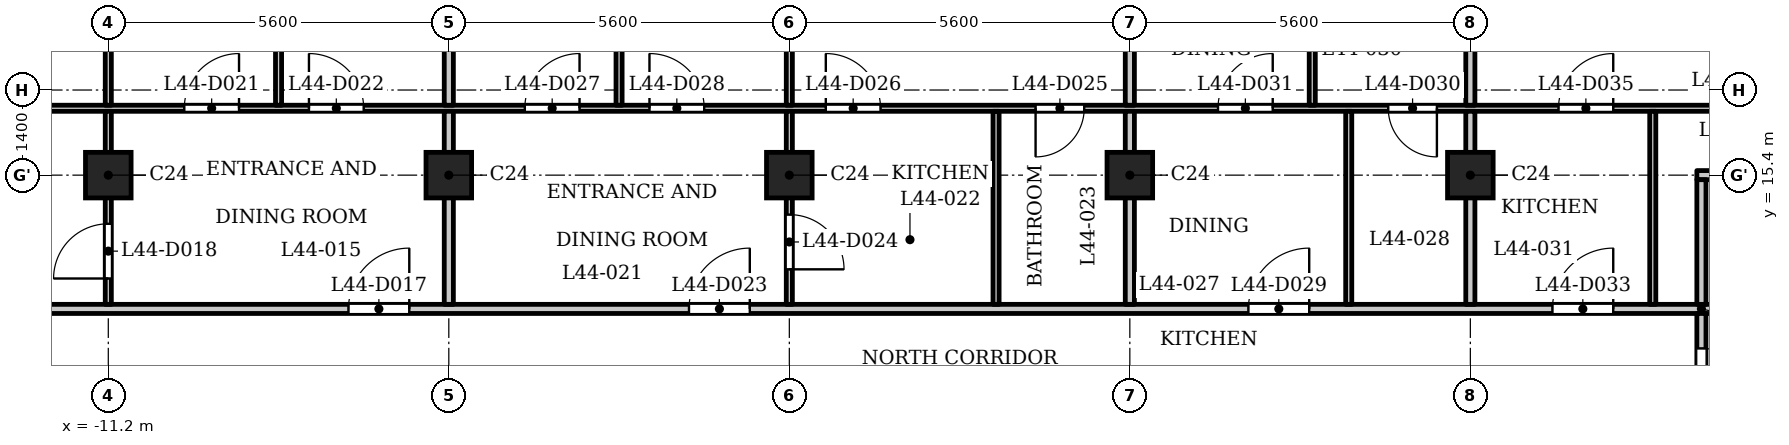
"""IFC4 building model, lengths in metres.
Left out: names, types, materials, properties, quantities, classifications, styles, units other than length and angle.
Written with IfcOpenShell. Run it as: python <this file> out.ifc"""

import sys

from ifc_helpers import new_model, si_unit, direction, frame, frame_2d, origin, origin_2d, place, context, subcontext, project, spatial, rectangle, extrude, element, fill, save


model = new_model("IFC4")
c1 = context("Model", 3, precision=1e-05, world=origin(), true_north=direction((0.0, 1.0)))
c2 = subcontext(c1, "Body", "Model", "MODEL_VIEW")
j1 = project(units=[si_unit("LENGTHUNIT", "METRE"), si_unit("PLANEANGLEUNIT", "RADIAN")], contexts=[c1])
p1 = place(None, origin())
s1 = spatial("IfcSite", under=j1, at=p1, CompositionType="ELEMENT")
p2 = place(p1, origin())
s2 = spatial("IfcBuilding", under=s1, at=p2, CompositionType="ELEMENT")
p3 = place(p2, frame((0.0, 0.0, 171.1)))
s3 = spatial("IfcBuildingStorey", under=s2, at=p3, CompositionType="ELEMENT", Elevation=171.1)
for number, where, z_axis, x_axis in (
    (1, (-11.2, 15.4, 0.0), (0.0, 0.0, 1.0), (1.0, 0.0, 0.0)),
    (2, (-5.6, 15.4, 0.0), (0.0, 0.0, 1.0), (1.0, 0.0, 0.0)),
    (3, (0.0, 15.4, 0.0), (0.0, 0.0, 1.0), (1.0, 0.0, 0.0)),
    (4, (5.6, 15.4, 0.0), (0.0, 0.0, 1.0), (1.0, 0.0, 0.0)),
    (5, (11.2, 15.4, 0.0), (0.0, 0.0, 1.0), (1.0, 0.0, 0.0)),
):
    element("IfcColumn", number, at=place(p3, frame(where, z_axis=z_axis, x_axis=x_axis)), inside=s3, PredefinedType="COLUMN", context=c2, shape_type="SweptSolid", body=[
        extrude(rectangle(XDim=0.75, YDim=0.75, at=origin_2d()), origin(), (0.0, 0.0, 1.0), 3.5),
    ])
p4 = place(p3, frame((-17.4, 13.2, 0.0), z_axis=(0.0, 0.0, 1.0), x_axis=(1.0, 0.0, 0.0)))
e6 = element("IfcWall", 6, at=p4, inside=s3, PredefinedType="PARTITIONING", context=c2, shape_type="SweptSolid", body=[
    extrude(rectangle(XDim=34.8, YDim=0.15, at=frame_2d((17.4, 0.0))), origin(), (0.0, 0.0, 1.0), 3.2),
])
p5 = place(p4, frame((0.25, 0.0, 0.0)))
e7 = element("IfcOpeningElement", 7, at=p5, cuts=e6, PredefinedType="OPENING", context=c2, shape_type="SweptSolid", body=[
    extrude(rectangle(XDim=1.0, YDim=2.1, at=frame_2d((0.5, 1.05))), frame((0.0, 0.085, 0.0), z_axis=(0.0, -1.0, 0.0), x_axis=(1.0, 0.0, 0.0)), (0.0, 0.0, 1.0), 0.17),
])
p6 = place(p4, frame((33.65, 0.0, 0.0)))
e8 = element("IfcOpeningElement", 8, at=p6, cuts=e6, PredefinedType="OPENING", context=c2, shape_type="SweptSolid", body=[
    extrude(rectangle(XDim=1.0, YDim=2.1, at=frame_2d((0.5, 1.05))), frame((0.0, 0.085, 0.0), z_axis=(0.0, -1.0, 0.0), x_axis=(1.0, 0.0, 0.0)), (0.0, 0.0, 1.0), 0.17),
])
p7 = place(p4, frame((10.15, 0.0, 0.0)))
e9 = element("IfcOpeningElement", 9, at=p7, cuts=e6, PredefinedType="OPENING", context=c2, shape_type="SweptSolid", body=[
    extrude(rectangle(XDim=1.0, YDim=2.1, at=frame_2d((0.5, 1.05))), frame((0.0, 0.085, 0.0), z_axis=(0.0, -1.0, 0.0), x_axis=(1.0, 0.0, 0.0)), (0.0, 0.0, 1.0), 0.17),
])
p8 = place(p4, frame((15.75, 0.0, 0.0)))
e10 = element("IfcOpeningElement", 10, at=p8, cuts=e6, PredefinedType="OPENING", context=c2, shape_type="SweptSolid", body=[
    extrude(rectangle(XDim=1.0, YDim=2.1, at=frame_2d((0.5, 1.05))), frame((0.0, 0.085, 0.0), z_axis=(0.0, -1.0, 0.0), x_axis=(1.0, 0.0, 0.0)), (0.0, 0.0, 1.0), 0.17),
])
p9 = place(p4, frame((24.95, 0.0, 0.0)))
e11 = element("IfcOpeningElement", 11, at=p9, cuts=e6, PredefinedType="OPENING", context=c2, shape_type="SweptSolid", body=[
    extrude(rectangle(XDim=1.0, YDim=2.1, at=frame_2d((0.5, 1.05))), frame((0.0, 0.085, 0.0), z_axis=(0.0, -1.0, 0.0), x_axis=(1.0, 0.0, 0.0)), (0.0, 0.0, 1.0), 0.17),
])
p10 = place(p4, frame((29.95, 0.0, 0.0)))
e12 = element("IfcOpeningElement", 12, at=p10, cuts=e6, PredefinedType="OPENING", context=c2, shape_type="SweptSolid", body=[
    extrude(rectangle(XDim=1.0, YDim=2.1, at=frame_2d((0.5, 1.05))), frame((0.0, 0.085, 0.0), z_axis=(0.0, -1.0, 0.0), x_axis=(1.0, 0.0, 0.0)), (0.0, 0.0, 1.0), 0.17),
])
p11 = place(p3, frame((14.925, 15.4, 0.0), z_axis=(0.0, 0.0, 1.0), x_axis=(1.0, 0.0, 0.0)))
e13 = element("IfcWall", 13, at=p11, inside=s3, PredefinedType="PARTITIONING", context=c2, shape_type="SweptSolid", body=[
    extrude(rectangle(XDim=12.559, YDim=0.15, at=frame_2d((6.279, 0.0))), origin(), (0.0, 0.0, 1.0), 3.2),
])
p12 = place(p11, frame((2.575, 0.0, 0.0)))
e14 = element("IfcOpeningElement", 14, at=p12, cuts=e13, PredefinedType="OPENING", context=c2, shape_type="SweptSolid", body=[
    extrude(rectangle(XDim=1.0, YDim=2.1, at=frame_2d((0.5, 1.05))), frame((0.0, 0.085, 0.0), z_axis=(0.0, -1.0, 0.0), x_axis=(1.0, 0.0, 0.0)), (0.0, 0.0, 1.0), 0.17),
])
p13 = place(p3, frame((-16.725, 16.5, 0.0), z_axis=(0.0, 0.0, 1.0), x_axis=(1.0, 0.0, 0.0)))
e15 = element("IfcWall", 15, at=p13, inside=s3, PredefinedType="PARTITIONING", context=c2, shape_type="SweptSolid", body=[
    extrude(rectangle(XDim=33.45, YDim=0.1, at=frame_2d((16.725, 0.0))), origin(), (0.0, 0.0, 1.0), 3.2),
])
p14 = place(p13, frame((0.575, 0.0, 0.0)))
e16 = element("IfcOpeningElement", 16, at=p14, cuts=e15, PredefinedType="OPENING", context=c2, shape_type="SweptSolid", body=[
    extrude(rectangle(XDim=0.8, YDim=2.1, at=frame_2d((0.4, 1.05))), frame((0.0, 0.06, 0.0), z_axis=(0.0, -1.0, 0.0), x_axis=(1.0, 0.0, 0.0)), (0.0, 0.0, 1.0), 0.12),
])
p15 = place(p13, frame((3.225, 0.0, 0.0)))
e17 = element("IfcOpeningElement", 17, at=p15, cuts=e15, PredefinedType="OPENING", context=c2, shape_type="SweptSolid", body=[
    extrude(rectangle(XDim=0.9, YDim=2.1, at=frame_2d((0.45, 1.05))), frame((0.0, 0.06, 0.0), z_axis=(0.0, -1.0, 0.0), x_axis=(1.0, 0.0, 0.0)), (0.0, 0.0, 1.0), 0.12),
])
p16 = place(p13, frame((6.775, 0.0, 0.0)))
e18 = element("IfcOpeningElement", 18, at=p16, cuts=e15, PredefinedType="OPENING", context=c2, shape_type="SweptSolid", body=[
    extrude(rectangle(XDim=0.9, YDim=2.1, at=frame_2d((0.45, 1.05))), frame((0.0, 0.06, 0.0), z_axis=(0.0, -1.0, 0.0), x_axis=(1.0, 0.0, 0.0)), (0.0, 0.0, 1.0), 0.12),
])
p17 = place(p13, frame((8.825, 0.0, 0.0)))
e19 = element("IfcOpeningElement", 19, at=p17, cuts=e15, PredefinedType="OPENING", context=c2, shape_type="SweptSolid", body=[
    extrude(rectangle(XDim=0.9, YDim=2.1, at=frame_2d((0.45, 1.05))), frame((0.0, 0.06, 0.0), z_axis=(0.0, -1.0, 0.0), x_axis=(1.0, 0.0, 0.0)), (0.0, 0.0, 1.0), 0.12),
])
p18 = place(p13, frame((20.775, 0.0, 0.0)))
e20 = element("IfcOpeningElement", 20, at=p18, cuts=e15, PredefinedType="OPENING", context=c2, shape_type="SweptSolid", body=[
    extrude(rectangle(XDim=0.8, YDim=2.1, at=frame_2d((0.4, 1.05))), frame((0.0, 0.06, 0.0), z_axis=(0.0, -1.0, 0.0), x_axis=(1.0, 0.0, 0.0)), (0.0, 0.0, 1.0), 0.12),
])
p19 = place(p13, frame((17.325, 0.0, 0.0)))
e21 = element("IfcOpeningElement", 21, at=p19, cuts=e15, PredefinedType="OPENING", context=c2, shape_type="SweptSolid", body=[
    extrude(rectangle(XDim=0.9, YDim=2.1, at=frame_2d((0.45, 1.05))), frame((0.0, 0.06, 0.0), z_axis=(0.0, -1.0, 0.0), x_axis=(1.0, 0.0, 0.0)), (0.0, 0.0, 1.0), 0.12),
])
p20 = place(p13, frame((12.375, 0.0, 0.0)))
e22 = element("IfcOpeningElement", 22, at=p20, cuts=e15, PredefinedType="OPENING", context=c2, shape_type="SweptSolid", body=[
    extrude(rectangle(XDim=0.9, YDim=2.1, at=frame_2d((0.45, 1.05))), frame((0.0, 0.06, 0.0), z_axis=(0.0, -1.0, 0.0), x_axis=(1.0, 0.0, 0.0)), (0.0, 0.0, 1.0), 0.12),
])
p21 = place(p13, frame((14.425, 0.0, 0.0)))
e23 = element("IfcOpeningElement", 23, at=p21, cuts=e15, PredefinedType="OPENING", context=c2, shape_type="SweptSolid", body=[
    extrude(rectangle(XDim=0.9, YDim=2.1, at=frame_2d((0.45, 1.05))), frame((0.0, 0.06, 0.0), z_axis=(0.0, -1.0, 0.0), x_axis=(1.0, 0.0, 0.0)), (0.0, 0.0, 1.0), 0.12),
])
p22 = place(p13, frame((26.575, 0.0, 0.0)))
e24 = element("IfcOpeningElement", 24, at=p22, cuts=e15, PredefinedType="OPENING", context=c2, shape_type="SweptSolid", body=[
    extrude(rectangle(XDim=0.8, YDim=2.1, at=frame_2d((0.4, 1.05))), frame((0.0, 0.06, 0.0), z_axis=(0.0, -1.0, 0.0), x_axis=(1.0, 0.0, 0.0)), (0.0, 0.0, 1.0), 0.12),
])
p23 = place(p13, frame((23.775, 0.0, 0.0)))
e25 = element("IfcOpeningElement", 25, at=p23, cuts=e15, PredefinedType="OPENING", context=c2, shape_type="SweptSolid", body=[
    extrude(rectangle(XDim=0.9, YDim=2.1, at=frame_2d((0.45, 1.05))), frame((0.0, 0.06, 0.0), z_axis=(0.0, -1.0, 0.0), x_axis=(1.0, 0.0, 0.0)), (0.0, 0.0, 1.0), 0.12),
])
p24 = place(p13, frame((32.075, 0.0, 0.0)))
e26 = element("IfcOpeningElement", 26, at=p24, cuts=e15, PredefinedType="OPENING", context=c2, shape_type="SweptSolid", body=[
    extrude(rectangle(XDim=0.8, YDim=2.1, at=frame_2d((0.4, 1.05))), frame((0.0, 0.06, 0.0), z_axis=(0.0, -1.0, 0.0), x_axis=(1.0, 0.0, 0.0)), (0.0, 0.0, 1.0), 0.12),
])
p25 = place(p13, frame((29.375, 0.0, 0.0)))
e27 = element("IfcOpeningElement", 27, at=p25, cuts=e15, PredefinedType="OPENING", context=c2, shape_type="SweptSolid", body=[
    extrude(rectangle(XDim=0.9, YDim=2.1, at=frame_2d((0.45, 1.05))), frame((0.0, 0.06, 0.0), z_axis=(0.0, -1.0, 0.0), x_axis=(1.0, 0.0, 0.0)), (0.0, 0.0, 1.0), 0.12),
])
p26 = place(p3, frame((-11.2, 13.275, 0.0), z_axis=(0.0, 0.0, 1.0), x_axis=(0.0, 1.0, 0.0)))
e28 = element("IfcWall", 28, at=p26, inside=s3, PredefinedType="PARTITIONING", context=c2, shape_type="SweptSolid", body=[
    extrude(rectangle(XDim=3.175, YDim=0.1, at=frame_2d((1.587, 0.0))), origin(), (0.0, 0.0, 1.0), 3.2),
])
p27 = place(p26, frame((0.425, 0.0, 0.0)))
e29 = element("IfcOpeningElement", 29, at=p27, cuts=e28, PredefinedType="OPENING", context=c2, shape_type="SweptSolid", body=[
    extrude(rectangle(XDim=0.9, YDim=2.1, at=frame_2d((0.45, 1.05))), frame((0.0, 0.06, 0.0), z_axis=(0.0, -1.0, 0.0), x_axis=(1.0, 0.0, 0.0)), (0.0, 0.0, 1.0), 0.12),
])
p28 = place(p3, frame((-11.2, 16.55, 0.0), z_axis=(0.0, 0.0, 1.0), x_axis=(0.0, 1.0, 0.0)))
e30 = element("IfcWall", 30, at=p28, inside=s3, PredefinedType="PARTITIONING", context=c2, shape_type="SweptSolid", body=[
    extrude(rectangle(XDim=6.33, YDim=0.1, at=frame_2d((3.165, 0.0))), origin(), (0.0, 0.0, 1.0), 3.2),
])
p29 = place(p3, frame((-8.4, 16.55, 0.0), z_axis=(0.0, 0.0, 1.0), x_axis=(0.0, 1.0, 0.0)))
e31 = element("IfcWall", 31, at=p29, inside=s3, PredefinedType="PARTITIONING", context=c2, shape_type="SweptSolid", body=[
    extrude(rectangle(XDim=5.53, YDim=0.1, at=frame_2d((2.765, 0.0))), origin(), (0.0, 0.0, 1.0), 3.2),
])
p30 = place(p3, frame((-5.6, 13.275, 0.0), z_axis=(0.0, 0.0, 1.0), x_axis=(0.0, 1.0, 0.0)))
e32 = element("IfcWall", 32, at=p30, inside=s3, PredefinedType="PARTITIONING", context=c2, shape_type="SweptSolid", body=[
    extrude(rectangle(XDim=3.175, YDim=0.15, at=frame_2d((1.587, 0.0))), origin(), (0.0, 0.0, 1.0), 3.2),
])
p31 = place(p3, frame((-5.6, 16.55, 0.0), z_axis=(0.0, 0.0, 1.0), x_axis=(0.0, 1.0, 0.0)))
e33 = element("IfcWall", 33, at=p31, inside=s3, PredefinedType="PARTITIONING", context=c2, shape_type="SweptSolid", body=[
    extrude(rectangle(XDim=6.33, YDim=0.15, at=frame_2d((3.165, 0.0))), origin(), (0.0, 0.0, 1.0), 3.2),
])
p32 = place(p3, frame((-2.8, 16.55, 0.0), z_axis=(0.0, 0.0, 1.0), x_axis=(0.0, 1.0, 0.0)))
e34 = element("IfcWall", 34, at=p32, inside=s3, PredefinedType="PARTITIONING", context=c2, shape_type="SweptSolid", body=[
    extrude(rectangle(XDim=5.53, YDim=0.1, at=frame_2d((2.765, 0.0))), origin(), (0.0, 0.0, 1.0), 3.2),
])
p33 = place(p3, frame((0.0, 13.275, 0.0), z_axis=(0.0, 0.0, 1.0), x_axis=(0.0, 1.0, 0.0)))
e35 = element("IfcWall", 35, at=p33, inside=s3, PredefinedType="PARTITIONING", context=c2, shape_type="SweptSolid", body=[
    extrude(rectangle(XDim=3.175, YDim=0.1, at=frame_2d((1.587, 0.0))), origin(), (0.0, 0.0, 1.0), 3.2),
])
p34 = place(p33, frame((0.576, 0.0, 0.0)))
e36 = element("IfcOpeningElement", 36, at=p34, cuts=e35, PredefinedType="OPENING", context=c2, shape_type="SweptSolid", body=[
    extrude(rectangle(XDim=0.9, YDim=2.1, at=frame_2d((0.45, 1.05))), frame((0.0, 0.06, 0.0), z_axis=(0.0, -1.0, 0.0), x_axis=(1.0, 0.0, 0.0)), (0.0, 0.0, 1.0), 0.12),
])
p35 = place(p3, frame((0.0, 16.55, 0.0), z_axis=(0.0, 0.0, 1.0), x_axis=(0.0, 1.0, 0.0)))
e37 = element("IfcWall", 37, at=p35, inside=s3, PredefinedType="PARTITIONING", context=c2, shape_type="SweptSolid", body=[
    extrude(rectangle(XDim=6.33, YDim=0.1, at=frame_2d((3.165, 0.0))), origin(), (0.0, 0.0, 1.0), 3.2),
])
p36 = place(p3, frame((3.4, 13.275, 0.0), z_axis=(0.0, 0.0, 1.0), x_axis=(0.0, 1.0, 0.0)))
e38 = element("IfcWall", 38, at=p36, inside=s3, PredefinedType="PARTITIONING", context=c2, shape_type="SweptSolid", body=[
    extrude(rectangle(XDim=3.175, YDim=0.1, at=frame_2d((1.587, 0.0))), origin(), (0.0, 0.0, 1.0), 3.2),
])
p37 = place(p3, frame((5.6, 13.275, 0.0), z_axis=(0.0, 0.0, 1.0), x_axis=(0.0, 1.0, 0.0)))
e39 = element("IfcWall", 39, at=p37, inside=s3, PredefinedType="PARTITIONING", context=c2, shape_type="SweptSolid", body=[
    extrude(rectangle(XDim=3.175, YDim=0.15, at=frame_2d((1.587, 0.0))), origin(), (0.0, 0.0, 1.0), 3.2),
])
p38 = place(p3, frame((5.6, 16.55, 0.0), z_axis=(0.0, 0.0, 1.0), x_axis=(0.0, 1.0, 0.0)))
e40 = element("IfcWall", 40, at=p38, inside=s3, PredefinedType="PARTITIONING", context=c2, shape_type="SweptSolid", body=[
    extrude(rectangle(XDim=6.33, YDim=0.15, at=frame_2d((3.165, 0.0))), origin(), (0.0, 0.0, 1.0), 3.2),
])
p39 = place(p3, frame((8.6, 16.55, 0.0), z_axis=(0.0, 0.0, 1.0), x_axis=(0.0, 1.0, 0.0)))
e41 = element("IfcWall", 41, at=p39, inside=s3, PredefinedType="PARTITIONING", context=c2, shape_type="SweptSolid", body=[
    extrude(rectangle(XDim=5.53, YDim=0.1, at=frame_2d((2.765, 0.0))), origin(), (0.0, 0.0, 1.0), 3.2),
])
p40 = place(p39, frame((4.35, 0.0, 0.0)))
e42 = element("IfcOpeningElement", 42, at=p40, cuts=e41, PredefinedType="OPENING", context=c2, shape_type="SweptSolid", body=[
    extrude(rectangle(XDim=0.9, YDim=2.1, at=frame_2d((0.45, 1.05))), frame((0.0, 0.06, 0.0), z_axis=(0.0, -1.0, 0.0), x_axis=(1.0, 0.0, 0.0)), (0.0, 0.0, 1.0), 0.12),
])
p41 = place(p3, frame((9.2, 13.275, 0.0), z_axis=(0.0, 0.0, 1.0), x_axis=(0.0, 1.0, 0.0)))
e43 = element("IfcWall", 43, at=p41, inside=s3, PredefinedType="PARTITIONING", context=c2, shape_type="SweptSolid", body=[
    extrude(rectangle(XDim=3.175, YDim=0.1, at=frame_2d((1.587, 0.0))), origin(), (0.0, 0.0, 1.0), 3.2),
])
p42 = place(p3, frame((11.2, 13.275, 0.0), z_axis=(0.0, 0.0, 1.0), x_axis=(0.0, 1.0, 0.0)))
e44 = element("IfcWall", 44, at=p42, inside=s3, PredefinedType="PARTITIONING", context=c2, shape_type="SweptSolid", body=[
    extrude(rectangle(XDim=3.175, YDim=0.15, at=frame_2d((1.587, 0.0))), origin(), (0.0, 0.0, 1.0), 3.2),
])
p43 = place(p3, frame((11.2, 16.55, 0.0), z_axis=(0.0, 0.0, 1.0), x_axis=(0.0, 1.0, 0.0)))
e45 = element("IfcWall", 45, at=p43, inside=s3, PredefinedType="PARTITIONING", context=c2, shape_type="SweptSolid", body=[
    extrude(rectangle(XDim=6.33, YDim=0.15, at=frame_2d((3.165, 0.0))), origin(), (0.0, 0.0, 1.0), 3.2),
])
p44 = place(p3, frame((14.2, 13.275, 0.0), z_axis=(0.0, 0.0, 1.0), x_axis=(0.0, 1.0, 0.0)))
e46 = element("IfcWall", 46, at=p44, inside=s3, PredefinedType="PARTITIONING", context=c2, shape_type="SweptSolid", body=[
    extrude(rectangle(XDim=3.175, YDim=0.1, at=frame_2d((1.587, 0.0))), origin(), (0.0, 0.0, 1.0), 3.2),
])
p45 = place(p3, frame((15.0, 6.769, 0.0), z_axis=(0.0, 0.0, 1.0), x_axis=(0.0, 1.0, 0.0)))
e47 = element("IfcWall", 47, at=p45, inside=s3, PredefinedType="PARTITIONING", context=c2, shape_type="SweptSolid", body=[
    extrude(rectangle(XDim=6.356, YDim=0.15, at=frame_2d((3.178, 0.0))), origin(), (0.0, 0.0, 1.0), 3.2),
])
p46 = place(p45, frame((4.781, 0.0, 0.0)))
e48 = element("IfcOpeningElement", 48, at=p46, cuts=e47, PredefinedType="OPENING", context=c2, shape_type="SweptSolid", body=[
    extrude(rectangle(XDim=1.0, YDim=2.1, at=frame_2d((0.5, 1.05))), frame((0.0, 0.085, 0.0), z_axis=(0.0, -1.0, 0.0), x_axis=(1.0, 0.0, 0.0)), (0.0, 0.0, 1.0), 0.17),
])
p47 = place(p3, frame((15.0, 13.275, 0.0), z_axis=(0.0, 0.0, 1.0), x_axis=(0.0, 1.0, 0.0)))
e49 = element("IfcWall", 49, at=p47, inside=s3, PredefinedType="PARTITIONING", context=c2, shape_type="SweptSolid", body=[
    extrude(rectangle(XDim=2.05, YDim=0.15, at=frame_2d((1.025, 0.0))), origin(), (0.0, 0.0, 1.0), 3.2),
])
p48 = place(p46, origin())
e50 = element("IfcDoor", 50, at=p48, inside=s3, OperationType="SINGLE_SWING_LEFT", PredefinedType="DOOR", context=c2, shape_type="SweptSolid", body=[
    extrude(rectangle(XDim=1.0, YDim=2.1, at=frame_2d((0.5, 1.05))), frame((0.0, 0.025, 0.0), z_axis=(0.0, -1.0, 0.0), x_axis=(1.0, 0.0, 0.0)), (0.0, 0.0, 1.0), 0.05),
])
fill(e48, e50)
p49 = place(p7, origin())
e51 = element("IfcDoor", 51, at=p49, inside=s3, OperationType="SINGLE_SWING_LEFT", PredefinedType="DOOR", context=c2, shape_type="SweptSolid", body=[
    extrude(rectangle(XDim=1.0, YDim=2.1, at=frame_2d((0.5, 1.05))), frame((0.0, 0.025, 0.0), z_axis=(0.0, -1.0, 0.0), x_axis=(1.0, 0.0, 0.0)), (0.0, 0.0, 1.0), 0.05),
])
fill(e9, e51)
p50 = place(p27, origin())
e52 = element("IfcDoor", 52, at=p50, inside=s3, OperationType="SINGLE_SWING_RIGHT", PredefinedType="DOOR", context=c2, shape_type="SweptSolid", body=[
    extrude(rectangle(XDim=0.9, YDim=2.1, at=frame_2d((0.45, 1.05))), frame((0.0, 0.025, 0.0), z_axis=(0.0, -1.0, 0.0), x_axis=(1.0, 0.0, 0.0)), (0.0, 0.0, 1.0), 0.05),
])
fill(e29, e52)
p51 = place(p16, origin())
e53 = element("IfcDoor", 53, at=p51, inside=s3, OperationType="SINGLE_SWING_LEFT", PredefinedType="DOOR", context=c2, shape_type="SweptSolid", body=[
    extrude(rectangle(XDim=0.9, YDim=2.1, at=frame_2d((0.45, 1.05))), frame((0.0, 0.025, 0.0), z_axis=(0.0, -1.0, 0.0), x_axis=(1.0, 0.0, 0.0)), (0.0, 0.0, 1.0), 0.05),
])
fill(e18, e53)
p52 = place(p17, origin())
e54 = element("IfcDoor", 54, at=p52, inside=s3, OperationType="SINGLE_SWING_RIGHT", PredefinedType="DOOR", context=c2, shape_type="SweptSolid", body=[
    extrude(rectangle(XDim=0.9, YDim=2.1, at=frame_2d((0.45, 1.05))), frame((0.0, 0.025, 0.0), z_axis=(0.0, -1.0, 0.0), x_axis=(1.0, 0.0, 0.0)), (0.0, 0.0, 1.0), 0.05),
])
fill(e19, e54)
p53 = place(p8, origin())
e55 = element("IfcDoor", 55, at=p53, inside=s3, OperationType="SINGLE_SWING_LEFT", PredefinedType="DOOR", context=c2, shape_type="SweptSolid", body=[
    extrude(rectangle(XDim=1.0, YDim=2.1, at=frame_2d((0.5, 1.05))), frame((0.0, 0.025, 0.0), z_axis=(0.0, -1.0, 0.0), x_axis=(1.0, 0.0, 0.0)), (0.0, 0.0, 1.0), 0.05),
])
fill(e10, e55)
p54 = place(p34, origin())
e56 = element("IfcDoor", 56, at=p54, inside=s3, OperationType="SINGLE_SWING_LEFT", PredefinedType="DOOR", context=c2, shape_type="SweptSolid", body=[
    extrude(rectangle(XDim=0.9, YDim=2.1, at=frame_2d((0.45, 1.05))), frame((0.0, 0.025, 0.0), z_axis=(0.0, -1.0, 0.0), x_axis=(1.0, 0.0, 0.0)), (0.0, 0.0, 1.0), 0.05),
])
fill(e36, e56)
p55 = place(p18, origin())
e57 = element("IfcDoor", 57, at=p55, inside=s3, OperationType="SINGLE_SWING_LEFT", PredefinedType="DOOR", context=c2, shape_type="SweptSolid", body=[
    extrude(rectangle(XDim=0.8, YDim=2.1, at=frame_2d((0.4, 1.05))), frame((0.0, 0.025, 0.0), z_axis=(0.0, -1.0, 0.0), x_axis=(1.0, 0.0, 0.0)), (0.0, 0.0, 1.0), 0.05),
])
fill(e20, e57)
p56 = place(p19, origin())
e58 = element("IfcDoor", 58, at=p56, inside=s3, OperationType="SINGLE_SWING_RIGHT", PredefinedType="DOOR", context=c2, shape_type="SweptSolid", body=[
    extrude(rectangle(XDim=0.9, YDim=2.1, at=frame_2d((0.45, 1.05))), frame((0.0, 0.025, 0.0), z_axis=(0.0, -1.0, 0.0), x_axis=(1.0, 0.0, 0.0)), (0.0, 0.0, 1.0), 0.05),
])
fill(e21, e58)
p57 = place(p20, origin())
e59 = element("IfcDoor", 59, at=p57, inside=s3, OperationType="SINGLE_SWING_LEFT", PredefinedType="DOOR", context=c2, shape_type="SweptSolid", body=[
    extrude(rectangle(XDim=0.9, YDim=2.1, at=frame_2d((0.45, 1.05))), frame((0.0, 0.025, 0.0), z_axis=(0.0, -1.0, 0.0), x_axis=(1.0, 0.0, 0.0)), (0.0, 0.0, 1.0), 0.05),
])
fill(e22, e59)
p58 = place(p21, origin())
e60 = element("IfcDoor", 60, at=p58, inside=s3, OperationType="SINGLE_SWING_RIGHT", PredefinedType="DOOR", context=c2, shape_type="SweptSolid", body=[
    extrude(rectangle(XDim=0.9, YDim=2.1, at=frame_2d((0.45, 1.05))), frame((0.0, 0.025, 0.0), z_axis=(0.0, -1.0, 0.0), x_axis=(1.0, 0.0, 0.0)), (0.0, 0.0, 1.0), 0.05),
])
fill(e23, e60)
p59 = place(p9, origin())
e61 = element("IfcDoor", 61, at=p59, inside=s3, OperationType="SINGLE_SWING_LEFT", PredefinedType="DOOR", context=c2, shape_type="SweptSolid", body=[
    extrude(rectangle(XDim=1.0, YDim=2.1, at=frame_2d((0.5, 1.05))), frame((0.0, 0.025, 0.0), z_axis=(0.0, -1.0, 0.0), x_axis=(1.0, 0.0, 0.0)), (0.0, 0.0, 1.0), 0.05),
])
fill(e11, e61)
p60 = place(p22, origin())
e62 = element("IfcDoor", 62, at=p60, inside=s3, OperationType="SINGLE_SWING_RIGHT", PredefinedType="DOOR", context=c2, shape_type="SweptSolid", body=[
    extrude(rectangle(XDim=0.8, YDim=2.1, at=frame_2d((0.4, 1.05))), frame((0.0, 0.025, 0.0), z_axis=(0.0, -1.0, 0.0), x_axis=(1.0, 0.0, 0.0)), (0.0, 0.0, 1.0), 0.05),
])
fill(e24, e62)
p61 = place(p23, origin())
e63 = element("IfcDoor", 63, at=p61, inside=s3, OperationType="SINGLE_SWING_LEFT", PredefinedType="DOOR", context=c2, shape_type="SweptSolid", body=[
    extrude(rectangle(XDim=0.9, YDim=2.1, at=frame_2d((0.45, 1.05))), frame((0.0, 0.025, 0.0), z_axis=(0.0, -1.0, 0.0), x_axis=(1.0, 0.0, 0.0)), (0.0, 0.0, 1.0), 0.05),
])
fill(e25, e63)
p62 = place(p10, origin())
e64 = element("IfcDoor", 64, at=p62, inside=s3, OperationType="SINGLE_SWING_LEFT", PredefinedType="DOOR", context=c2, shape_type="SweptSolid", body=[
    extrude(rectangle(XDim=1.0, YDim=2.1, at=frame_2d((0.5, 1.05))), frame((0.0, 0.025, 0.0), z_axis=(0.0, -1.0, 0.0), x_axis=(1.0, 0.0, 0.0)), (0.0, 0.0, 1.0), 0.05),
])
fill(e12, e64)
p63 = place(p25, origin())
e65 = element("IfcDoor", 65, at=p63, inside=s3, OperationType="SINGLE_SWING_LEFT", PredefinedType="DOOR", context=c2, shape_type="SweptSolid", body=[
    extrude(rectangle(XDim=0.9, YDim=2.1, at=frame_2d((0.45, 1.05))), frame((0.0, 0.025, 0.0), z_axis=(0.0, -1.0, 0.0), x_axis=(1.0, 0.0, 0.0)), (0.0, 0.0, 1.0), 0.05),
])
fill(e27, e65)
save(model, sys.argv[1])
